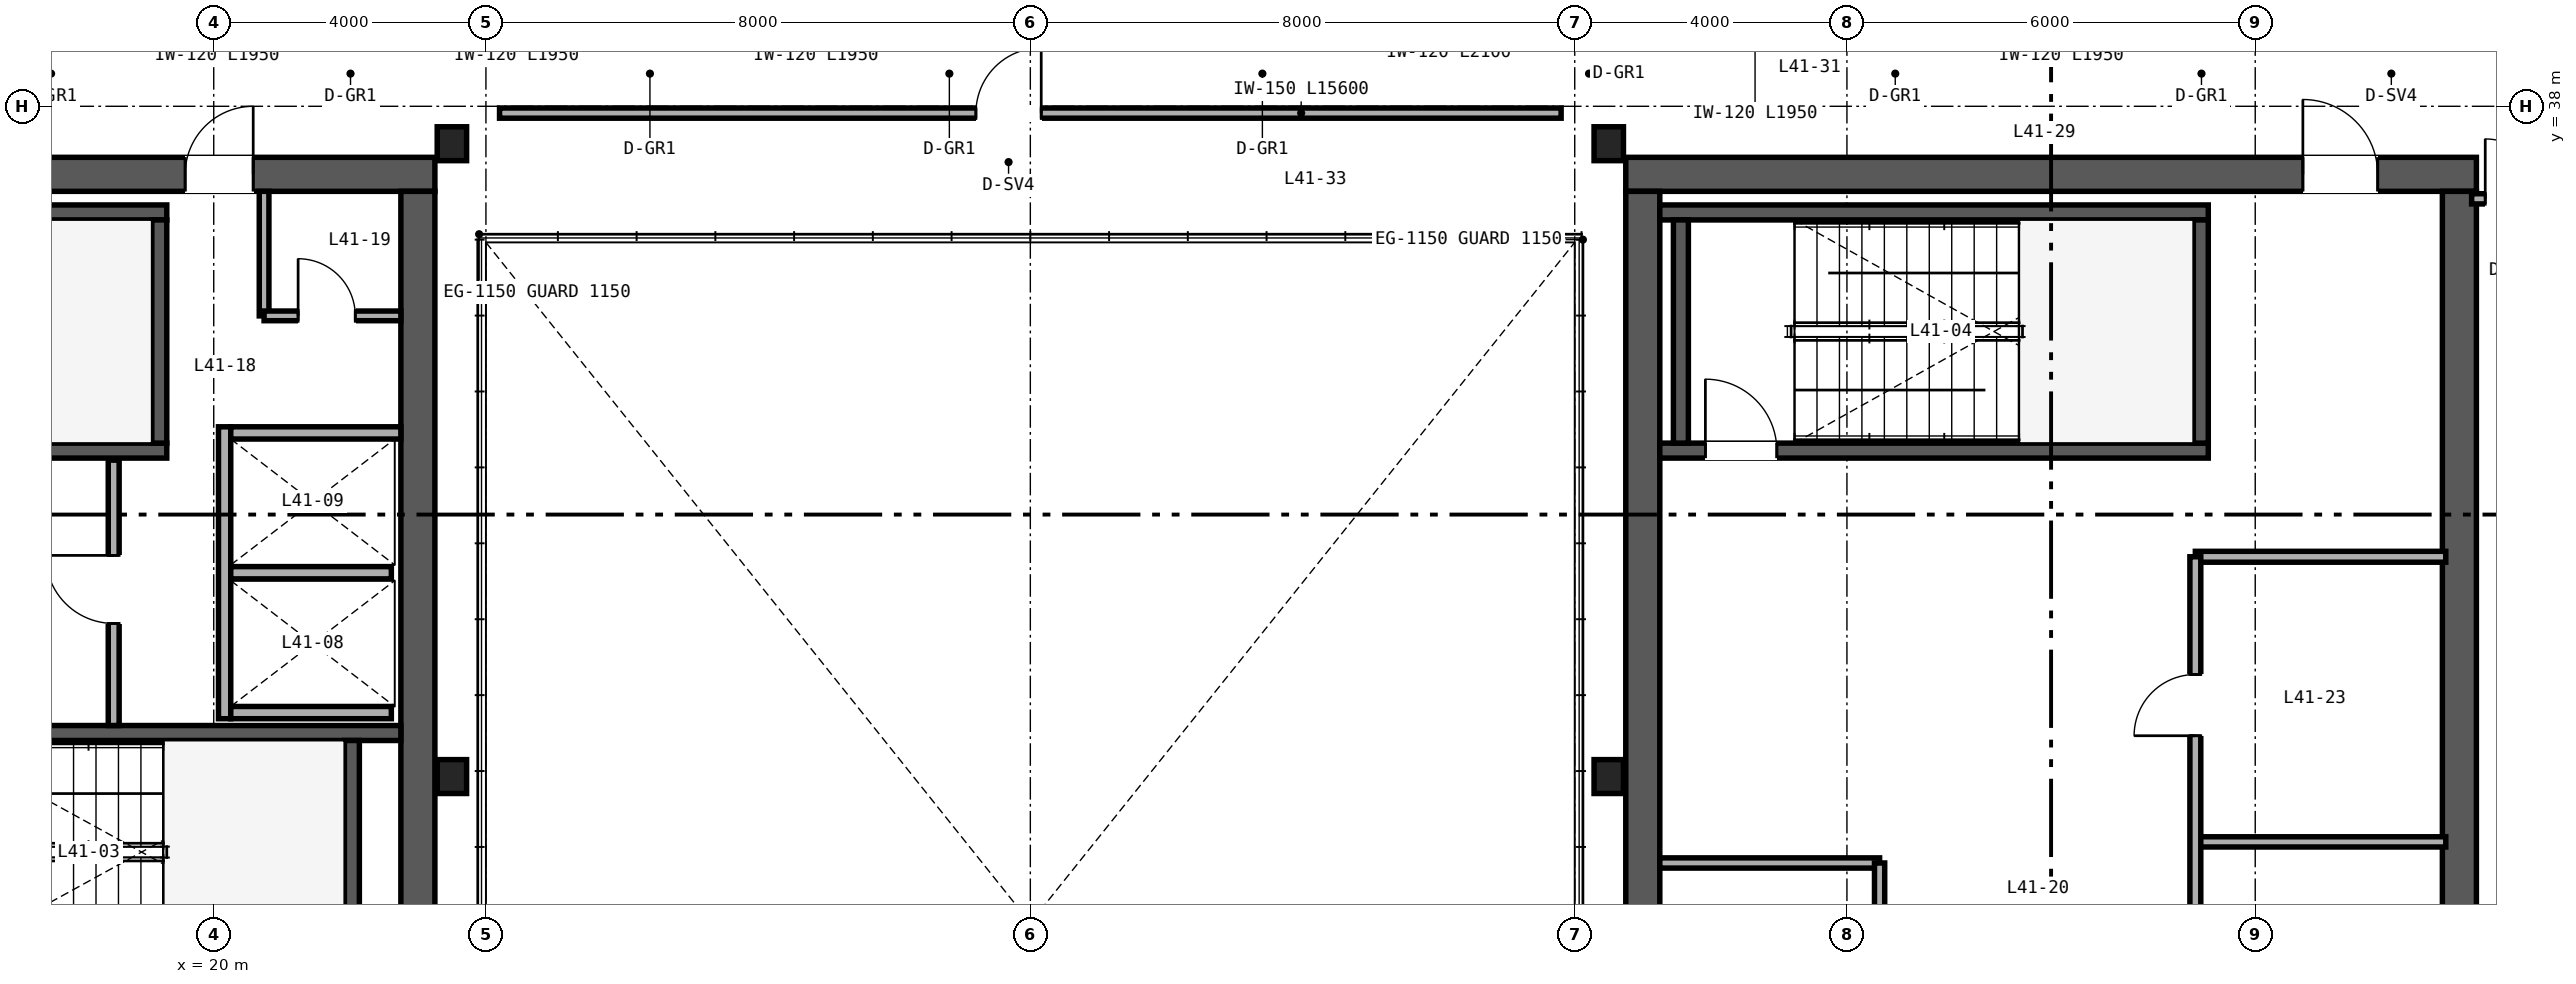
"""IFC4 building model, lengths in metres.
Left out: names, types, materials, properties, quantities, classifications, styles, units other than length and angle.
Written with IfcOpenShell. Run it as: python <this file> out.ifc"""

import sys

from ifc_helpers import new_model, si_unit, direction, frame, frame_2d, origin, origin_2d, place, context, subcontext, project, spatial, rectangle, i_section, extrude, source, transform, mapped, element, fill, save


model = new_model("IFC4")
c1 = context("Model", 3, precision=1e-05, world=origin(), true_north=direction((0.0, 1.0)))
c2 = subcontext(c1, "Body", "Model", "MODEL_VIEW")
j1 = project(units=[si_unit("LENGTHUNIT", "METRE"), si_unit("PLANEANGLEUNIT", "RADIAN")], contexts=[c1])
p1 = place(None, origin())
s1 = spatial("IfcSite", under=j1, at=p1, CompositionType="ELEMENT")
p2 = place(p1, origin())
s2 = spatial("IfcBuilding", under=s1, at=p2, CompositionType="ELEMENT")
p3 = place(p2, frame((0.0, 0.0, 166.8)))
s3 = spatial("IfcBuildingStorey", under=s2, at=p3, CompositionType="ELEMENT", Elevation=166.8)
p4 = place(p3, frame((10.75, 37.0, 0.0), z_axis=(0.0, 0.0, 1.0), x_axis=(1.0, 0.0, 0.0)))
e1 = element("IfcWall", 1, at=p4, inside=s3, PredefinedType="SHEAR", context=c2, shape_type="SweptSolid", body=[
    extrude(rectangle(XDim=12.5, YDim=0.5, at=frame_2d((6.25, 0.0))), origin(), (0.0, 0.0, 1.0), 3.37),
])
p5 = place(p4, frame((8.83, 0.0, 0.0)))
e2 = element("IfcOpeningElement", 2, at=p5, cuts=e1, PredefinedType="OPENING", context=c2, shape_type="SweptSolid", body=[
    extrude(rectangle(XDim=1.0, YDim=2.15, at=frame_2d((0.5, 1.075))), frame((0.0, 0.26, 0.0), z_axis=(0.0, -1.0, 0.0), x_axis=(1.0, 0.0, 0.0)), (0.0, 0.0, 1.0), 0.52),
])
p6 = place(p3, frame((23.0, 15.25, 0.0), z_axis=(0.0, 0.0, 1.0), x_axis=(0.0, 1.0, 0.0)))
e3 = element("IfcWall", 3, at=p6, inside=s3, PredefinedType="SHEAR", context=c2, shape_type="SweptSolid", body=[
    extrude(rectangle(XDim=21.5, YDim=0.5, at=frame_2d((10.75, 0.0))), origin(), (0.0, 0.0, 1.0), 3.37),
])
p7 = place(p3, frame((40.75, 37.0, 0.0), z_axis=(0.0, 0.0, 1.0), x_axis=(1.0, 0.0, 0.0)))
e4 = element("IfcWall", 4, at=p7, inside=s3, PredefinedType="SHEAR", context=c2, shape_type="SweptSolid", body=[
    extrude(rectangle(XDim=12.5, YDim=0.5, at=frame_2d((6.25, 0.0))), origin(), (0.0, 0.0, 1.0), 3.37),
])
p8 = place(p7, frame((9.95, 0.0, 0.0)))
e5 = element("IfcOpeningElement", 5, at=p8, cuts=e4, PredefinedType="OPENING", context=c2, shape_type="SweptSolid", body=[
    extrude(rectangle(XDim=1.1, YDim=2.15, at=frame_2d((0.55, 1.075))), frame((0.0, 0.26, 0.0), z_axis=(0.0, -1.0, 0.0), x_axis=(1.0, 0.0, 0.0)), (0.0, 0.0, 1.0), 0.52),
])
for number, where, z_axis, x_axis in (
    (6, (41.0, 15.25, 0.0), (0.0, 0.0, 1.0), (0.0, 1.0, 0.0)),
    (7, (53.0, 15.25, 0.0), (0.0, 0.0, 1.0), (0.0, 1.0, 0.0)),
):
    element("IfcWall", number, at=place(p3, frame(where, z_axis=z_axis, x_axis=x_axis)), inside=s3, PredefinedType="SHEAR", context=c2, shape_type="SweptSolid", body=[
        extrude(rectangle(XDim=21.5, YDim=0.5, at=frame_2d((10.75, 0.0))), origin(), (0.0, 0.0, 1.0), 3.37),
    ])
p9 = place(p3, frame((11.25, 32.94, 0.0), z_axis=(0.0, 0.0, 1.0), x_axis=(1.0, 0.0, 0.0)))
e8 = element("IfcWall", 8, at=p9, inside=s3, PredefinedType="SHEAR", context=c2, shape_type="SweptSolid", body=[
    extrude(rectangle(XDim=8.06, YDim=0.22, at=frame_2d((4.03, 0.0))), origin(), (0.0, 0.0, 1.0), 3.4),
])
p10 = place(p9, frame((0.67, 0.0, 0.0)))
e9 = element("IfcOpeningElement", 9, at=p10, cuts=e8, PredefinedType="OPENING", context=c2, shape_type="SweptSolid", body=[
    extrude(rectangle(XDim=1.05, YDim=2.15, at=frame_2d((0.525, 1.075))), frame((0.0, 0.12, 0.0), z_axis=(0.0, -1.0, 0.0), x_axis=(1.0, 0.0, 0.0)), (0.0, 0.0, 1.0), 0.24),
])
p11 = place(p3, frame((11.25, 36.44, 0.0), z_axis=(0.0, 0.0, 1.0), x_axis=(1.0, 0.0, 0.0)))
e10 = element("IfcWall", 10, at=p11, inside=s3, PredefinedType="SHEAR", context=c2, shape_type="SweptSolid", body=[
    extrude(rectangle(XDim=8.06, YDim=0.22, at=frame_2d((4.03, 0.0))), origin(), (0.0, 0.0, 1.0), 3.4),
])
p12 = place(p3, frame((19.2, 33.05, 0.0), z_axis=(0.0, 0.0, 1.0), x_axis=(0.0, 1.0, 0.0)))
e11 = element("IfcWall", 11, at=p12, inside=s3, PredefinedType="SHEAR", context=c2, shape_type="SweptSolid", body=[
    extrude(rectangle(XDim=3.28, YDim=0.22, at=frame_2d((1.64, 0.0))), origin(), (0.0, 0.0, 1.0), 3.4),
])
p13 = place(p3, frame((14.18, 28.79, 0.0), z_axis=(0.0, 0.0, 1.0), x_axis=(1.0, 0.0, 0.0)))
e12 = element("IfcWall", 12, at=p13, inside=s3, PredefinedType="SHEAR", context=c2, shape_type="SweptSolid", body=[
    extrude(rectangle(XDim=8.57, YDim=0.22, at=frame_2d((4.285, 0.0))), origin(), (0.0, 0.0, 1.0), 3.4),
])
p14 = place(p3, frame((22.03, 25.4, 0.0), z_axis=(0.0, 0.0, 1.0), x_axis=(0.0, 1.0, 0.0)))
e13 = element("IfcWall", 13, at=p14, inside=s3, PredefinedType="SHEAR", context=c2, shape_type="SweptSolid", body=[
    extrude(rectangle(XDim=3.28, YDim=0.22, at=frame_2d((1.64, 0.0))), origin(), (0.0, 0.0, 1.0), 3.4),
])
p15 = place(p3, frame((41.25, 32.94, 0.0), z_axis=(0.0, 0.0, 1.0), x_axis=(1.0, 0.0, 0.0)))
e14 = element("IfcWall", 14, at=p15, inside=s3, PredefinedType="SHEAR", context=c2, shape_type="SweptSolid", body=[
    extrude(rectangle(XDim=8.06, YDim=0.22, at=frame_2d((4.03, 0.0))), origin(), (0.0, 0.0, 1.0), 3.4),
])
p16 = place(p15, frame((0.67, 0.0, 0.0)))
e15 = element("IfcOpeningElement", 15, at=p16, cuts=e14, PredefinedType="OPENING", context=c2, shape_type="SweptSolid", body=[
    extrude(rectangle(XDim=1.05, YDim=2.15, at=frame_2d((0.525, 1.075))), frame((0.0, 0.12, 0.0), z_axis=(0.0, -1.0, 0.0), x_axis=(1.0, 0.0, 0.0)), (0.0, 0.0, 1.0), 0.24),
])
p17 = place(p3, frame((41.25, 36.44, 0.0), z_axis=(0.0, 0.0, 1.0), x_axis=(1.0, 0.0, 0.0)))
e16 = element("IfcWall", 16, at=p17, inside=s3, PredefinedType="SHEAR", context=c2, shape_type="SweptSolid", body=[
    extrude(rectangle(XDim=8.06, YDim=0.22, at=frame_2d((4.03, 0.0))), origin(), (0.0, 0.0, 1.0), 3.4),
])
for number, where, z_axis, x_axis in (
    (17, (41.56, 33.05, 0.0), (0.0, 0.0, 1.0), (0.0, 1.0, 0.0)),
    (18, (49.2, 33.05, 0.0), (0.0, 0.0, 1.0), (0.0, 1.0, 0.0)),
):
    element("IfcWall", number, at=place(p3, frame(where, z_axis=z_axis, x_axis=x_axis)), inside=s3, PredefinedType="SHEAR", context=c2, shape_type="SweptSolid", body=[
        extrude(rectangle(XDim=3.28, YDim=0.22, at=frame_2d((1.64, 0.0))), origin(), (0.0, 0.0, 1.0), 3.4),
    ])
m1 = source(origin(), c2, "Body", "SweptSolid", [
    extrude(i_section(OverallWidth=0.432, OverallDepth=0.498, WebThickness=0.056, FlangeThickness=0.089, FilletRadius=0.025, at=origin_2d()), origin(), (0.0, 0.0, 1.0), 3.37),
])
for number, where, z_axis, x_axis in (
    (19, (23.5, 28.15, 0.0), (0.0, 0.0, 1.0), (1.0, 0.0, 0.0)),
    (20, (40.5, 28.15, 0.0), (0.0, 0.0, 1.0), (1.0, 0.0, 0.0)),
    (21, (23.5, 37.45, 0.0), (0.0, 0.0, 1.0), (1.0, 0.0, 0.0)),
    (22, (40.5, 37.45, 0.0), (0.0, 0.0, 1.0), (1.0, 0.0, 0.0)),
):
    element("IfcColumn", number, at=place(p3, frame(where, z_axis=z_axis, x_axis=x_axis)), inside=s3, PredefinedType="COLUMN", context=c2, shape_type="MappedRepresentation", body=[
        mapped(m1, transform((0.0, 0.0, 0.0), scale=1.0)),
    ])
p18 = place(p3, frame((20.16, 29.0, 0.0), z_axis=(0.0, 0.0, 1.0), x_axis=(0.0, 1.0, 0.0)))
e23 = element("IfcWall", 23, at=p18, inside=s3, PredefinedType="SOLIDWALL", context=c2, shape_type="SweptSolid", body=[
    extrude(rectangle(XDim=4.29, YDim=0.18, at=frame_2d((2.145, 0.0))), origin(), (0.0, 0.0, 1.0), 3.37),
])
p19 = place(p3, frame((20.25, 29.09, 0.0), z_axis=(0.0, 0.0, 1.0), x_axis=(1.0, 0.0, 0.0)))
e24 = element("IfcWall", 24, at=p19, inside=s3, PredefinedType="SOLIDWALL", context=c2, shape_type="SweptSolid", body=[
    extrude(rectangle(XDim=2.36, YDim=0.18, at=frame_2d((1.18, 0.0))), origin(), (0.0, 0.0, 1.0), 3.37),
])
p20 = place(p3, frame((20.25, 33.2, 0.0), z_axis=(0.0, 0.0, 1.0), x_axis=(1.0, 0.0, 0.0)))
e25 = element("IfcWall", 25, at=p20, inside=s3, PredefinedType="SOLIDWALL", context=c2, shape_type="SweptSolid", body=[
    extrude(rectangle(XDim=2.5, YDim=0.18, at=frame_2d((1.25, 0.0))), origin(), (0.0, 0.0, 1.0), 3.37),
])
p21 = place(p3, frame((20.25, 31.145, 0.0), z_axis=(0.0, 0.0, 1.0), x_axis=(1.0, 0.0, 0.0)))
e26 = element("IfcWall", 26, at=p21, inside=s3, PredefinedType="SOLIDWALL", context=c2, shape_type="SweptSolid", body=[
    extrude(rectangle(XDim=2.36, YDim=0.18, at=frame_2d((1.18, 0.0))), origin(), (0.0, 0.0, 1.0), 3.37),
])
p22 = place(p3, frame((18.53, 28.9, 0.0), z_axis=(0.0, 0.0, 1.0), x_axis=(0.0, 1.0, 0.0)))
e27 = element("IfcWall", 27, at=p22, inside=s3, PredefinedType="PARTITIONING", context=c2, shape_type="SweptSolid", body=[
    extrude(rectangle(XDim=3.9, YDim=0.16, at=frame_2d((1.95, 0.0))), origin(), (0.0, 0.0, 1.0), 3.37),
])
p23 = place(p22, frame((1.5, 0.0, 0.0)))
e28 = element("IfcOpeningElement", 28, at=p23, cuts=e27, PredefinedType="OPENING", context=c2, shape_type="SweptSolid", body=[
    extrude(rectangle(XDim=1.0, YDim=2.15, at=frame_2d((0.5, 1.075))), frame((0.0, 0.09, 0.0), z_axis=(0.0, -1.0, 0.0), x_axis=(1.0, 0.0, 0.0)), (0.0, 0.0, 1.0), 0.18),
])
p24 = place(p3, frame((20.74, 34.92, 0.0), z_axis=(0.0, 0.0, 1.0), x_axis=(0.0, 1.0, 0.0)))
e29 = element("IfcWall", 29, at=p24, inside=s3, PredefinedType="PARTITIONING", context=c2, shape_type="SweptSolid", body=[
    extrude(rectangle(XDim=1.83, YDim=0.142, at=frame_2d((0.915, 0.0))), origin(), (0.0, 0.0, 1.0), 3.37),
])
p25 = place(p3, frame((20.74, 34.92, 0.0), z_axis=(0.0, 0.0, 1.0), x_axis=(1.0, 0.0, 0.0)))
e30 = element("IfcWall", 30, at=p25, inside=s3, PredefinedType="PARTITIONING", context=c2, shape_type="SweptSolid", body=[
    extrude(rectangle(XDim=2.01, YDim=0.142, at=frame_2d((1.005, 0.0))), origin(), (0.0, 0.0, 1.0), 3.37),
])
p26 = place(p25, frame((0.5, 0.0, 0.0)))
e31 = element("IfcOpeningElement", 31, at=p26, cuts=e30, PredefinedType="OPENING", context=c2, shape_type="SweptSolid", body=[
    extrude(rectangle(XDim=0.84, YDim=2.1, at=frame_2d((0.42, 1.05))), frame((0.0, 0.081, 0.0), z_axis=(0.0, -1.0, 0.0), x_axis=(1.0, 0.0, 0.0)), (0.0, 0.0, 1.0), 0.162),
])
p27 = place(p3, frame((49.12, 31.38, 0.0), z_axis=(0.0, 0.0, 1.0), x_axis=(1.0, 0.0, 0.0)))
e32 = element("IfcWall", 32, at=p27, inside=s3, PredefinedType="PARTITIONING", context=c2, shape_type="SweptSolid", body=[
    extrude(rectangle(XDim=3.68, YDim=0.16, at=frame_2d((1.84, 0.0))), origin(), (0.0, 0.0, 1.0), 2.47),
])
p28 = place(p3, frame((49.12, 27.19, 0.0), z_axis=(0.0, 0.0, 1.0), x_axis=(1.0, 0.0, 0.0)))
e33 = element("IfcWall", 33, at=p28, inside=s3, PredefinedType="PARTITIONING", context=c2, shape_type="SweptSolid", body=[
    extrude(rectangle(XDim=3.68, YDim=0.15, at=frame_2d((1.84, 0.0))), origin(), (0.0, 0.0, 1.0), 3.37),
])
p29 = place(p3, frame((49.12, 15.25, 0.0), z_axis=(0.0, 0.0, 1.0), x_axis=(0.0, 1.0, 0.0)))
e34 = element("IfcWall", 34, at=p29, inside=s3, PredefinedType="PARTITIONING", context=c2, shape_type="SweptSolid", body=[
    extrude(rectangle(XDim=16.13, YDim=0.16, at=frame_2d((8.065, 0.0))), origin(), (0.0, 0.0, 1.0), 2.443),
])
p30 = place(p29, frame((2.2, 0.0, 0.0)))
e35 = element("IfcOpeningElement", 35, at=p30, cuts=e34, PredefinedType="OPENING", context=c2, shape_type="SweptSolid", body=[
    extrude(rectangle(XDim=0.9, YDim=2.15, at=frame_2d((0.45, 1.075))), frame((0.0, 0.09, 0.0), z_axis=(0.0, -1.0, 0.0), x_axis=(1.0, 0.0, 0.0)), (0.0, 0.0, 1.0), 0.18),
])
p31 = place(p29, frame((8.2, 0.0, 0.0)))
e36 = element("IfcOpeningElement", 36, at=p31, cuts=e34, PredefinedType="OPENING", context=c2, shape_type="SweptSolid", body=[
    extrude(rectangle(XDim=0.9, YDim=2.15, at=frame_2d((0.45, 1.075))), frame((0.0, 0.09, 0.0), z_axis=(0.0, -1.0, 0.0), x_axis=(1.0, 0.0, 0.0)), (0.0, 0.0, 1.0), 0.18),
])
p32 = place(p29, frame((13.5, 0.0, 0.0)))
e37 = element("IfcOpeningElement", 37, at=p32, cuts=e34, PredefinedType="OPENING", context=c2, shape_type="SweptSolid", body=[
    extrude(rectangle(XDim=0.9, YDim=2.15, at=frame_2d((0.45, 1.075))), frame((0.0, 0.09, 0.0), z_axis=(0.0, -1.0, 0.0), x_axis=(1.0, 0.0, 0.0)), (0.0, 0.0, 1.0), 0.18),
])
p33 = place(p3, frame((41.25, 26.88, 0.0), z_axis=(0.0, 0.0, 1.0), x_axis=(1.0, 0.0, 0.0)))
e38 = element("IfcWall", 38, at=p33, inside=s3, PredefinedType="PARTITIONING", context=c2, shape_type="SweptSolid", body=[
    extrude(rectangle(XDim=3.23, YDim=0.15, at=frame_2d((1.615, 0.0))), origin(), (0.0, 0.0, 1.0), 3.37),
])
p34 = place(p3, frame((44.48, 15.25, 0.0), z_axis=(0.0, 0.0, 1.0), x_axis=(0.0, 1.0, 0.0)))
e39 = element("IfcWall", 39, at=p34, inside=s3, PredefinedType="PARTITIONING", context=c2, shape_type="SweptSolid", body=[
    extrude(rectangle(XDim=11.63, YDim=0.15, at=frame_2d((5.815, 0.0))), origin(), (0.0, 0.0, 1.0), 3.37),
])
p35 = place(p34, frame((2.2, 0.0, 0.0)))
e40 = element("IfcOpeningElement", 40, at=p35, cuts=e39, PredefinedType="OPENING", context=c2, shape_type="SweptSolid", body=[
    extrude(rectangle(XDim=0.9, YDim=2.15, at=frame_2d((0.45, 1.075))), frame((0.0, 0.085, 0.0), z_axis=(0.0, -1.0, 0.0), x_axis=(1.0, 0.0, 0.0)), (0.0, 0.0, 1.0), 0.17),
])
p36 = place(p34, frame((7.87, 0.0, 0.0)))
e41 = element("IfcOpeningElement", 41, at=p36, cuts=e39, PredefinedType="OPENING", context=c2, shape_type="SweptSolid", body=[
    extrude(rectangle(XDim=0.9, YDim=2.15, at=frame_2d((0.45, 1.075))), frame((0.0, 0.085, 0.0), z_axis=(0.0, -1.0, 0.0), x_axis=(1.0, 0.0, 0.0)), (0.0, 0.0, 1.0), 0.17),
])
p37 = place(p3, frame((24.2, 37.9, 0.0), z_axis=(0.0, 0.0, 1.0), x_axis=(1.0, 0.0, 0.0)))
e42 = element("IfcWall", 42, at=p37, inside=s3, PredefinedType="PARTITIONING", context=c2, shape_type="SweptSolid", body=[
    extrude(rectangle(XDim=15.6, YDim=0.15, at=frame_2d((7.8, 0.0))), origin(), (0.0, 0.0, 1.0), 3.37),
])
p38 = place(p37, frame((7.0, 0.0, 0.0)))
e43 = element("IfcOpeningElement", 43, at=p38, cuts=e42, PredefinedType="OPENING", context=c2, shape_type="SweptSolid", body=[
    extrude(rectangle(XDim=0.96, YDim=2.15, at=frame_2d((0.48, 1.075))), frame((0.0, 0.085, 0.0), z_axis=(0.0, -1.0, 0.0), x_axis=(1.0, 0.0, 0.0)), (0.0, 0.0, 1.0), 0.17),
])
p39 = place(p3, frame((53.18, 36.64, 0.0), z_axis=(0.0, 0.0, 1.0), x_axis=(1.0, 0.0, 0.0)))
e44 = element("IfcWall", 44, at=p39, inside=s3, PredefinedType="PARTITIONING", context=c2, shape_type="SweptSolid", body=[
    extrude(rectangle(XDim=2.66, YDim=0.15, at=frame_2d((1.33, 0.0))), origin(), (0.0, 0.0, 1.0), 2.753),
])
p40 = place(p39, frame((0.2, 0.0, 0.0)))
e45 = element("IfcOpeningElement", 45, at=p40, cuts=e44, PredefinedType="OPENING", context=c2, shape_type="SweptSolid", body=[
    extrude(rectangle(XDim=0.88, YDim=2.15, at=frame_2d((0.44, 1.075))), frame((0.0, 0.085, 0.0), z_axis=(0.0, -1.0, 0.0), x_axis=(1.0, 0.0, 0.0)), (0.0, 0.0, 1.0), 0.17),
])
m2 = source(origin(), c2, "Body", "SweptSolid", [
    extrude(rectangle(XDim=1.05, YDim=2.15, at=frame_2d((0.525, 1.075))), frame((0.0, 0.025, 0.0), z_axis=(0.0, -1.0, 0.0), x_axis=(1.0, 0.0, 0.0)), (0.0, 0.0, 1.0), 0.05),
])
p41 = place(p16, origin())
e46 = element("IfcDoor", 46, at=p41, inside=s3, OperationType="SINGLE_SWING_LEFT", PredefinedType="DOOR", context=c2, shape_type="MappedRepresentation", body=[
    mapped(m2, transform((0.0, 0.0, 0.0), scale=1.0)),
])
fill(e15, e46)
m3 = source(origin(), c2, "Body", "SweptSolid", [
    extrude(rectangle(XDim=1.0, YDim=2.15, at=frame_2d((0.5, 1.075))), frame((0.0, 0.025, 0.0), z_axis=(0.0, -1.0, 0.0), x_axis=(1.0, 0.0, 0.0)), (0.0, 0.0, 1.0), 0.05),
])
p42 = place(p23, origin())
e47 = element("IfcDoor", 47, at=p42, inside=s3, OperationType="SINGLE_SWING_RIGHT", PredefinedType="DOOR", context=c2, shape_type="MappedRepresentation", body=[
    mapped(m3, transform((0.0, 0.0, 0.0), scale=1.0)),
])
fill(e28, e47)
m4 = source(origin(), c2, "Body", "SweptSolid", [
    extrude(rectangle(XDim=0.84, YDim=2.1, at=frame_2d((0.42, 1.05))), frame((0.0, 0.025, 0.0), z_axis=(0.0, -1.0, 0.0), x_axis=(1.0, 0.0, 0.0)), (0.0, 0.0, 1.0), 0.05),
])
p43 = place(p26, origin())
e48 = element("IfcDoor", 48, at=p43, inside=s3, OperationType="SINGLE_SWING_LEFT", PredefinedType="DOOR", context=c2, shape_type="MappedRepresentation", body=[
    mapped(m4, transform((0.0, 0.0, 0.0), scale=1.0)),
])
fill(e31, e48)
p44 = place(p5, origin())
e49 = element("IfcDoor", 49, at=p44, inside=s3, OperationType="SINGLE_SWING_RIGHT", PredefinedType="DOOR", context=c2, shape_type="MappedRepresentation", body=[
    mapped(m3, transform((0.0, 0.0, 0.0), scale=1.0)),
])
fill(e2, e49)
m5 = source(origin(), c2, "Body", "SweptSolid", [
    extrude(rectangle(XDim=1.1, YDim=2.15, at=frame_2d((0.55, 1.075))), frame((0.0, 0.025, 0.0), z_axis=(0.0, -1.0, 0.0), x_axis=(1.0, 0.0, 0.0)), (0.0, 0.0, 1.0), 0.05),
])
p45 = place(p8, origin())
e50 = element("IfcDoor", 50, at=p45, inside=s3, OperationType="SINGLE_SWING_LEFT", PredefinedType="DOOR", context=c2, shape_type="MappedRepresentation", body=[
    mapped(m5, transform((0.0, 0.0, 0.0), scale=1.0)),
])
fill(e5, e50)
m6 = source(origin(), c2, "Body", "SweptSolid", [
    extrude(rectangle(XDim=0.9, YDim=2.15, at=frame_2d((0.45, 1.075))), frame((0.0, 0.025, 0.0), z_axis=(0.0, -1.0, 0.0), x_axis=(1.0, 0.0, 0.0)), (0.0, 0.0, 1.0), 0.05),
])
p46 = place(p32, origin())
e51 = element("IfcDoor", 51, at=p46, inside=s3, OperationType="SINGLE_SWING_LEFT", PredefinedType="DOOR", context=c2, shape_type="MappedRepresentation", body=[
    mapped(m6, transform((0.0, 0.0, 0.0), scale=1.0)),
])
fill(e37, e51)
m7 = source(origin(), c2, "Body", "SweptSolid", [
    extrude(rectangle(XDim=0.96, YDim=2.15, at=frame_2d((0.48, 1.075))), frame((0.0, 0.025, 0.0), z_axis=(0.0, -1.0, 0.0), x_axis=(1.0, 0.0, 0.0)), (0.0, 0.0, 1.0), 0.05),
])
p47 = place(p38, origin())
e52 = element("IfcDoor", 52, at=p47, inside=s3, OperationType="SINGLE_SWING_RIGHT", PredefinedType="DOOR", context=c2, shape_type="MappedRepresentation", body=[
    mapped(m7, transform((0.0, 0.0, 0.0), scale=1.0)),
])
fill(e43, e52)
m8 = source(origin(), c2, "Body", "SweptSolid", [
    extrude(rectangle(XDim=0.88, YDim=2.15, at=frame_2d((0.44, 1.075))), frame((0.0, 0.025, 0.0), z_axis=(0.0, -1.0, 0.0), x_axis=(1.0, 0.0, 0.0)), (0.0, 0.0, 1.0), 0.05),
])
p48 = place(p40, origin())
e53 = element("IfcDoor", 53, at=p48, inside=s3, OperationType="SINGLE_SWING_LEFT", PredefinedType="DOOR", context=c2, shape_type="MappedRepresentation", body=[
    mapped(m8, transform((0.0, 0.0, 0.0), scale=1.0)),
])
fill(e45, e53)
save(model, sys.argv[1])
